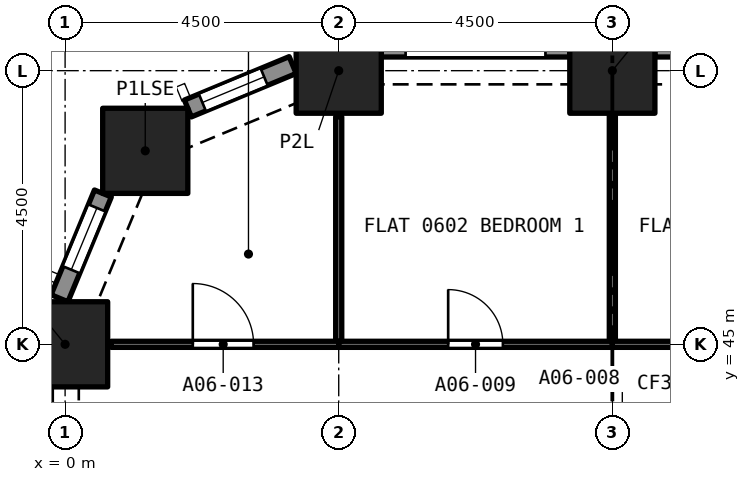
"""IFC4 building model, lengths in metres.
Left out: names, types, materials, properties, quantities, classifications, styles, units other than length and angle.
Written with IfcOpenShell. Run it as: python <this file> out.ifc"""

import sys

from ifc_helpers import new_model, si_unit, direction, frame, frame_2d, origin, origin_2d, place, context, subcontext, project, spatial, rectangle, extrude, element, fill, save


model = new_model("IFC4")
c1 = context("Model", 3, precision=1e-05, world=origin(), true_north=direction((0.0, 1.0)))
c2 = subcontext(c1, "Body", "Model", "MODEL_VIEW")
j1 = project(units=[si_unit("LENGTHUNIT", "METRE"), si_unit("PLANEANGLEUNIT", "RADIAN")], contexts=[c1])
p1 = place(None, origin())
s1 = spatial("IfcSite", under=j1, at=p1, CompositionType="ELEMENT")
p2 = place(p1, origin())
s2 = spatial("IfcBuilding", under=s1, at=p2, CompositionType="ELEMENT")
p3 = place(p2, frame((0.0, 0.0, 30.4)))
s3 = spatial("IfcBuildingStorey", under=s2, at=p3, CompositionType="ELEMENT", Elevation=30.4)
for number, where, z_axis, x_axis in (
    (1, (0.0, 45.0, 0.0), (0.0, 0.0, 1.0), (1.0, 0.0, 0.0)),
    (2, (1.318, 48.182, 0.0), (0.0, 0.0, 1.0), (1.0, 0.0, 0.0)),
    (3, (4.5, 49.5, 0.0), (0.0, 0.0, 1.0), (1.0, 0.0, 0.0)),
    (4, (9.0, 49.5, 0.0), (0.0, 0.0, 1.0), (1.0, 0.0, 0.0)),
):
    element("IfcColumn", number, at=place(p3, frame(where, z_axis=z_axis, x_axis=x_axis)), inside=s3, PredefinedType="COLUMN", context=c2, shape_type="SweptSolid", body=[
        extrude(rectangle(XDim=1.4, YDim=1.4, at=origin_2d()), origin(), (0.0, 0.0, 1.0), 3.2),
    ])
p4 = place(p3, frame((9.7, 49.875, 0.0), z_axis=(0.0, 0.0, 1.0), x_axis=(1.0, 0.0, 0.0)))
e5 = element("IfcWall", 5, at=p4, inside=s3, PredefinedType="SOLIDWALL", context=c2, shape_type="SweptSolid", body=[
    extrude(rectangle(XDim=3.1, YDim=0.3, at=frame_2d((1.55, 0.0))), origin(), (0.0, 0.0, 1.0), 3.2),
])
p5 = place(p4, frame((0.4, 0.0, 0.45)))
e6 = element("IfcOpeningElement", 6, at=p5, cuts=e5, PredefinedType="OPENING", context=c2, shape_type="SweptSolid", body=[
    extrude(rectangle(XDim=2.3, YDim=1.95, at=frame_2d((1.15, 0.975))), frame((0.0, 0.16, 0.0), z_axis=(0.0, -1.0, 0.0), x_axis=(1.0, 0.0, 0.0)), (0.0, 0.0, 1.0), 0.32),
])
p6 = place(p3, frame((5.2, 49.875, 0.0), z_axis=(0.0, 0.0, 1.0), x_axis=(1.0, 0.0, 0.0)))
e7 = element("IfcWall", 7, at=p6, inside=s3, PredefinedType="SOLIDWALL", context=c2, shape_type="SweptSolid", body=[
    extrude(rectangle(XDim=3.1, YDim=0.3, at=frame_2d((1.55, 0.0))), origin(), (0.0, 0.0, 1.0), 3.2),
])
p7 = place(p6, frame((0.4, 0.0, 0.45)))
e8 = element("IfcOpeningElement", 8, at=p7, cuts=e7, PredefinedType="OPENING", context=c2, shape_type="SweptSolid", body=[
    extrude(rectangle(XDim=2.3, YDim=1.95, at=frame_2d((1.15, 0.975))), frame((0.0, 0.16, 0.0), z_axis=(0.0, -1.0, 0.0), x_axis=(1.0, 0.0, 0.0)), (0.0, 0.0, 1.0), 0.32),
])
p8 = place(p3, frame((2.02, 48.878, 0.0), z_axis=(0.0, 0.0, 1.0), x_axis=(0.923903565336, 0.38262540684, 0.0)))
e9 = element("IfcWall", 9, at=p8, inside=s3, PredefinedType="SOLIDWALL", context=c2, shape_type="SweptSolid", body=[
    extrude(rectangle(XDim=1.865, YDim=0.3, at=frame_2d((0.933, 0.0))), origin(), (0.0, 0.0, 1.0), 3.2),
])
p9 = place(p8, frame((0.258, 0.0, 0.45)))
e10 = element("IfcOpeningElement", 10, at=p9, cuts=e9, PredefinedType="OPENING", context=c2, shape_type="SweptSolid", body=[
    extrude(rectangle(XDim=1.1, YDim=1.95, at=frame_2d((0.55, 0.975))), frame((0.0, 0.16, 0.0), z_axis=(0.0, -1.0, 0.0), x_axis=(1.0, 0.0, 0.0)), (0.0, 0.0, 1.0), 0.32),
])
p10 = place(p3, frame((-0.092, 45.757, 0.0), z_axis=(0.0, 0.0, 1.0), x_axis=(0.382737135771, 0.923857286003, 0.0)))
e11 = element("IfcWall", 11, at=p10, inside=s3, PredefinedType="SOLIDWALL", context=c2, shape_type="SweptSolid", body=[
    extrude(rectangle(XDim=1.865, YDim=0.3, at=frame_2d((0.933, 0.0))), origin(), (0.0, 0.0, 1.0), 3.2),
])
p11 = place(p10, frame((0.508, 0.0, 0.45)))
e12 = element("IfcOpeningElement", 12, at=p11, cuts=e11, PredefinedType="OPENING", context=c2, shape_type="SweptSolid", body=[
    extrude(rectangle(XDim=1.1, YDim=1.95, at=frame_2d((0.55, 0.975))), frame((0.0, 0.16, 0.0), z_axis=(0.0, -1.0, 0.0), x_axis=(1.0, 0.0, 0.0)), (0.0, 0.0, 1.0), 0.32),
])
p12 = place(p3, frame((9.0, 45.05, 0.0), z_axis=(0.0, 0.0, 1.0), x_axis=(0.0, 1.0, 0.0)))
e13 = element("IfcWall", 13, at=p12, inside=s3, PredefinedType="PARTITIONING", context=c2, shape_type="SweptSolid", body=[
    extrude(rectangle(XDim=3.75, YDim=0.1, at=frame_2d((1.875, 0.0))), origin(), (0.0, 0.0, 1.0), 2.9),
])
p13 = place(p3, frame((4.5, 45.0, 0.0), z_axis=(0.0, 0.0, 1.0), x_axis=(1.0, 0.0, 0.0)))
e14 = element("IfcWall", 14, at=p13, inside=s3, PredefinedType="PARTITIONING", context=c2, shape_type="SweptSolid", body=[
    extrude(rectangle(XDim=4.5, YDim=0.1, at=frame_2d((2.25, 0.0))), origin(), (0.0, 0.0, 1.0), 2.9),
])
p14 = place(p13, frame((1.8, 0.0, 0.0)))
e15 = element("IfcOpeningElement", 15, at=p14, cuts=e14, PredefinedType="OPENING", context=c2, shape_type="SweptSolid", body=[
    extrude(rectangle(XDim=0.9, YDim=2.1, at=frame_2d((0.45, 1.05))), frame((0.0, 0.06, 0.0), z_axis=(0.0, -1.0, 0.0), x_axis=(1.0, 0.0, 0.0)), (0.0, 0.0, 1.0), 0.12),
])
p15 = place(p3, frame((4.5, 45.05, 0.0), z_axis=(0.0, 0.0, 1.0), x_axis=(0.0, 1.0, 0.0)))
e16 = element("IfcWall", 16, at=p15, inside=s3, PredefinedType="PARTITIONING", context=c2, shape_type="SweptSolid", body=[
    extrude(rectangle(XDim=3.692, YDim=0.1, at=frame_2d((1.846, 0.0))), origin(), (0.0, 0.0, 1.0), 2.9),
])
p16 = place(p3, frame((9.0, 45.0, 0.0), z_axis=(0.0, 0.0, 1.0), x_axis=(1.0, 0.0, 0.0)))
e17 = element("IfcWall", 17, at=p16, inside=s3, PredefinedType="PARTITIONING", context=c2, shape_type="SweptSolid", body=[
    extrude(rectangle(XDim=4.5, YDim=0.1, at=frame_2d((2.25, 0.0))), origin(), (0.0, 0.0, 1.0), 2.9),
])
p17 = place(p16, frame((1.8, 0.0, 0.0)))
e18 = element("IfcOpeningElement", 18, at=p17, cuts=e17, PredefinedType="OPENING", context=c2, shape_type="SweptSolid", body=[
    extrude(rectangle(XDim=0.9, YDim=2.1, at=frame_2d((0.45, 1.05))), frame((0.0, 0.06, 0.0), z_axis=(0.0, -1.0, 0.0), x_axis=(1.0, 0.0, 0.0)), (0.0, 0.0, 1.0), 0.12),
])
p18 = place(p3, frame((0.758, 45.0, 0.0), z_axis=(0.0, 0.0, 1.0), x_axis=(1.0, 0.0, 0.0)))
e19 = element("IfcWall", 19, at=p18, inside=s3, PredefinedType="PARTITIONING", context=c2, shape_type="SweptSolid", body=[
    extrude(rectangle(XDim=3.742, YDim=0.1, at=frame_2d((1.871, 0.0))), origin(), (0.0, 0.0, 1.0), 2.9),
])
p19 = place(p18, frame((1.342, 0.0, 0.0)))
e20 = element("IfcOpeningElement", 20, at=p19, cuts=e19, PredefinedType="OPENING", context=c2, shape_type="SweptSolid", body=[
    extrude(rectangle(XDim=1.0, YDim=2.1, at=frame_2d((0.5, 1.05))), frame((0.0, 0.06, 0.0), z_axis=(0.0, -1.0, 0.0), x_axis=(1.0, 0.0, 0.0)), (0.0, 0.0, 1.0), 0.12),
])
p20 = place(p9, origin())
e21 = element("IfcWindow", 21, at=p20, inside=s3, PartitioningType="SINGLE_PANEL", PredefinedType="WINDOW", context=c2, shape_type="SweptSolid", body=[
    extrude(rectangle(XDim=1.1, YDim=1.95, at=frame_2d((0.55, 0.975))), frame((0.0, 0.03, 0.0), z_axis=(0.0, -1.0, 0.0), x_axis=(1.0, 0.0, 0.0)), (0.0, 0.0, 1.0), 0.06),
])
fill(e10, e21)
p21 = place(p11, origin())
e22 = element("IfcWindow", 22, at=p21, inside=s3, PartitioningType="SINGLE_PANEL", PredefinedType="WINDOW", context=c2, shape_type="SweptSolid", body=[
    extrude(rectangle(XDim=1.1, YDim=1.95, at=frame_2d((0.55, 0.975))), frame((0.0, 0.03, 0.0), z_axis=(0.0, -1.0, 0.0), x_axis=(1.0, 0.0, 0.0)), (0.0, 0.0, 1.0), 0.06),
])
fill(e12, e22)
p22 = place(p14, origin())
e23 = element("IfcDoor", 23, at=p22, inside=s3, OperationType="SINGLE_SWING_RIGHT", PredefinedType="DOOR", context=c2, shape_type="SweptSolid", body=[
    extrude(rectangle(XDim=0.9, YDim=2.1, at=frame_2d((0.45, 1.05))), frame((0.0, 0.025, 0.0), z_axis=(0.0, -1.0, 0.0), x_axis=(1.0, 0.0, 0.0)), (0.0, 0.0, 1.0), 0.05),
])
fill(e15, e23)
p23 = place(p19, origin())
e24 = element("IfcDoor", 24, at=p23, inside=s3, OperationType="SINGLE_SWING_LEFT", PredefinedType="DOOR", context=c2, shape_type="SweptSolid", body=[
    extrude(rectangle(XDim=1.0, YDim=2.1, at=frame_2d((0.5, 1.05))), frame((0.0, 0.025, 0.0), z_axis=(0.0, -1.0, 0.0), x_axis=(1.0, 0.0, 0.0)), (0.0, 0.0, 1.0), 0.05),
])
fill(e20, e24)
save(model, sys.argv[1])
